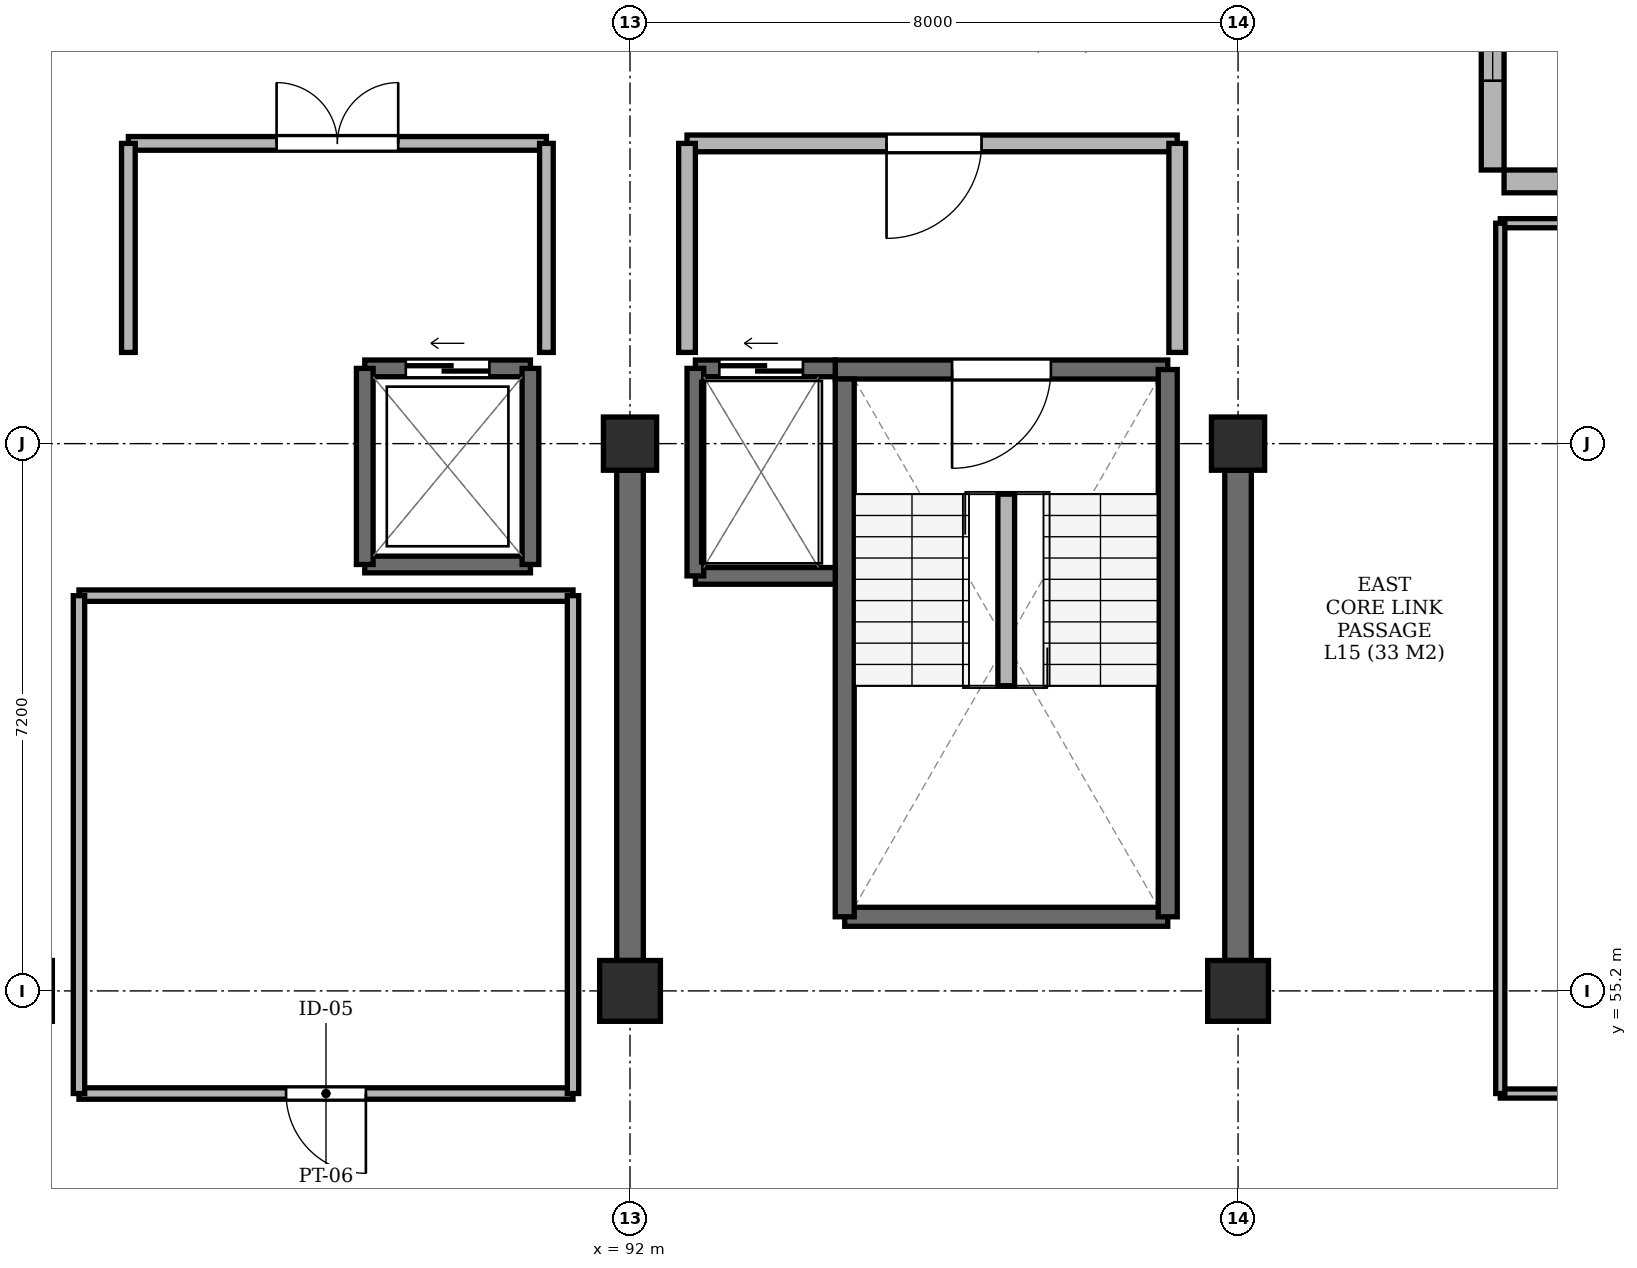
"""IFC4 building model, lengths in metres.
Left out: names, types, materials, properties, quantities, classifications, styles, units other than length and angle.
Written with IfcOpenShell. Run it as: python <this file> out.ifc"""

import sys

from ifc_helpers import new_model, si_unit, direction, frame, frame_2d, origin, origin_2d, place, context, subcontext, project, spatial, rectangle, extrude, element, fill, save


model = new_model("IFC4")
c1 = context("Model", 3, precision=1e-05, world=origin(), true_north=direction((0.0, 1.0)))
c2 = subcontext(c1, "Body", "Model", "MODEL_VIEW")
j1 = project(units=[si_unit("LENGTHUNIT", "METRE"), si_unit("PLANEANGLEUNIT", "RADIAN")], contexts=[c1])
p1 = place(None, origin())
s1 = spatial("IfcSite", under=j1, at=p1, CompositionType="ELEMENT")
p2 = place(p1, origin())
s2 = spatial("IfcBuilding", under=s1, at=p2, CompositionType="ELEMENT")
p3 = place(p2, frame((0.0, 0.0, 60.05)))
s3 = spatial("IfcBuildingStorey", under=s2, at=p3, CompositionType="ELEMENT", Elevation=60.05)
for number, where, z_axis, x_axis in (
    (1, (84.0, 55.2, -0.21), (0.0, 0.0, 1.0), (1.0, 0.0, 0.0)),
    (2, (92.0, 55.2, -0.21), (0.0, 0.0, 1.0), (1.0, 0.0, 0.0)),
):
    element("IfcColumn", number, at=place(p3, frame(where, z_axis=z_axis, x_axis=x_axis)), inside=s3, PredefinedType="COLUMN", context=c2, shape_type="SweptSolid", body=[
        extrude(rectangle(XDim=0.8, YDim=0.8, at=origin_2d()), origin(), (0.0, 0.0, 1.0), 3.25),
    ])
p4 = place(p3, frame((92.0, 62.4, -0.21), z_axis=(0.0, 0.0, 1.0), x_axis=(1.0, 0.0, 0.0)))
e3 = element("IfcColumn", 3, at=p4, inside=s3, PredefinedType="COLUMN", context=c2, shape_type="SweptSolid", body=[
    extrude(rectangle(XDim=0.7, YDim=0.7, at=origin_2d()), origin(), (0.0, 0.0, 1.0), 3.25),
])
p5 = place(p3, frame((100.0, 55.2, -0.21), z_axis=(0.0, 0.0, 1.0), x_axis=(1.0, 0.0, 0.0)))
e4 = element("IfcColumn", 4, at=p5, inside=s3, PredefinedType="COLUMN", context=c2, shape_type="SweptSolid", body=[
    extrude(rectangle(XDim=0.8, YDim=0.8, at=origin_2d()), origin(), (0.0, 0.0, 1.0), 3.25),
])
p6 = place(p3, frame((100.0, 62.4, -0.21), z_axis=(0.0, 0.0, 1.0), x_axis=(1.0, 0.0, 0.0)))
e5 = element("IfcColumn", 5, at=p6, inside=s3, PredefinedType="COLUMN", context=c2, shape_type="SweptSolid", body=[
    extrude(rectangle(XDim=0.7, YDim=0.7, at=origin_2d()), origin(), (0.0, 0.0, 1.0), 3.25),
])
for number, where, z_axis, x_axis in (
    (6, (92.0, 55.6, 0.0), (0.0, 0.0, 1.0), (0.0, 1.0, 0.0)),
    (7, (100.0, 55.6, 0.0), (0.0, 0.0, 1.0), (0.0, 1.0, 0.0)),
):
    element("IfcWall", number, at=place(p3, frame(where, z_axis=z_axis, x_axis=x_axis)), inside=s3, PredefinedType="SHEAR", context=c2, shape_type="SweptSolid", body=[
        extrude(rectangle(XDim=6.45, YDim=0.35, at=frame_2d((3.225, 0.0))), origin(), (0.0, 0.0, 1.0), 3.04),
    ])
p7 = place(p3, frame((108.0, 65.85, 0.0), z_axis=(0.0, 0.0, 1.0), x_axis=(-1.0, 0.0, 0.0)))
e8 = element("IfcWall", 8, at=p7, inside=s3, PredefinedType="SOLIDWALL", context=c2, shape_type="SweptSolid", body=[
    extrude(rectangle(XDim=4.5, YDim=0.3, at=frame_2d((2.25, 0.0))), origin(), (0.0, 0.0, 1.0), 2.53),
])
p8 = place(p7, frame((1.575, 0.0, 0.62)))
e9 = element("IfcOpeningElement", 9, at=p8, cuts=e8, PredefinedType="OPENING", context=c2, shape_type="SweptSolid", body=[
    extrude(rectangle(XDim=1.35, YDim=1.8, at=frame_2d((0.675, 0.9))), frame((0.0, 0.162, 0.0), z_axis=(0.0, -1.0, 0.0), x_axis=(1.0, 0.0, 0.0)), (0.0, 0.0, 1.0), 0.324),
])
p9 = place(p3, frame((103.35, 66.0, 0.0), z_axis=(0.0, 0.0, 1.0), x_axis=(0.0, 1.0, 0.0)))
e10 = element("IfcWall", 10, at=p9, inside=s3, PredefinedType="SOLIDWALL", context=c2, shape_type="SweptSolid", body=[
    extrude(rectangle(XDim=3.6, YDim=0.3, at=frame_2d((1.8, 0.0))), origin(), (0.0, 0.0, 1.0), 2.53),
])
p10 = place(p9, frame((1.175, 0.0, 0.62)))
e11 = element("IfcOpeningElement", 11, at=p10, cuts=e10, PredefinedType="OPENING", context=c2, shape_type="SweptSolid", body=[
    extrude(rectangle(XDim=1.25, YDim=1.75, at=frame_2d((0.625, 0.875))), frame((0.0, 0.162, 0.0), z_axis=(0.0, -1.0, 0.0), x_axis=(1.0, 0.0, 0.0)), (0.0, 0.0, 1.0), 0.324),
])
p11 = place(p3, frame((94.825, 56.175, 0.0), z_axis=(0.0, 0.0, 1.0), x_axis=(1.0, 0.0, 0.0)))
e12 = element("IfcWall", 12, at=p11, inside=s3, PredefinedType="SHEAR", context=c2, shape_type="SweptSolid", body=[
    extrude(rectangle(XDim=4.25, YDim=0.25, at=frame_2d((2.125, 0.0))), origin(), (0.0, 0.0, 1.0), 3.04),
])
p12 = place(p3, frame((99.075, 63.375, 0.0), z_axis=(0.0, 0.0, 1.0), x_axis=(-1.0, 0.0, 0.0)))
e13 = element("IfcWall", 13, at=p12, inside=s3, PredefinedType="SHEAR", context=c2, shape_type="SweptSolid", body=[
    extrude(rectangle(XDim=4.375, YDim=0.25, at=frame_2d((2.188, 0.0))), origin(), (0.0, 0.0, 1.0), 3.04),
])
p13 = place(p12, frame((1.538, 0.0, 0.0)))
e14 = element("IfcOpeningElement", 14, at=p13, cuts=e13, PredefinedType="OPENING", context=c2, shape_type="SweptSolid", body=[
    extrude(rectangle(XDim=1.3, YDim=2.2, at=frame_2d((0.65, 1.1))), frame((0.0, 0.137, 0.0), z_axis=(0.0, -1.0, 0.0), x_axis=(1.0, 0.0, 0.0)), (0.0, 0.0, 1.0), 0.274),
])
p14 = place(p3, frame((94.825, 63.25, 0.0), z_axis=(0.0, 0.0, 1.0), x_axis=(0.0, -1.0, 0.0)))
e15 = element("IfcWall", 15, at=p14, inside=s3, PredefinedType="SHEAR", context=c2, shape_type="SweptSolid", body=[
    extrude(rectangle(XDim=7.075, YDim=0.25, at=frame_2d((3.538, 0.0))), origin(), (0.0, 0.0, 1.0), 3.04),
])
p15 = place(p3, frame((99.075, 56.175, 0.0), z_axis=(0.0, 0.0, 1.0), x_axis=(0.0, 1.0, 0.0)))
e16 = element("IfcWall", 16, at=p15, inside=s3, PredefinedType="SHEAR", context=c2, shape_type="SweptSolid", body=[
    extrude(rectangle(XDim=7.2, YDim=0.25, at=frame_2d((3.6, 0.0))), origin(), (0.0, 0.0, 1.0), 3.04),
])
p16 = place(p3, frame((96.95, 59.215, 0.0), z_axis=(0.0, 0.0, 1.0), x_axis=(0.0, 1.0, 0.0)))
e17 = element("IfcWall", 17, at=p16, inside=s3, PredefinedType="PARTITIONING", context=c2, shape_type="SweptSolid", body=[
    extrude(rectangle(XDim=2.52, YDim=0.22, at=frame_2d((1.26, 0.0))), origin(), (0.0, 0.0, 1.0), 3.04),
])
p17 = place(p3, frame((92.86, 60.66, 0.0), z_axis=(0.0, 0.0, 1.0), x_axis=(1.0, 0.0, 0.0)))
e18 = element("IfcWall", 18, at=p17, inside=s3, PredefinedType="SHEAR", context=c2, shape_type="SweptSolid", body=[
    extrude(rectangle(XDim=1.84, YDim=0.22, at=frame_2d((0.92, 0.0))), origin(), (0.0, 0.0, 1.0), 3.04),
])
p18 = place(p3, frame((94.7, 63.39, 0.0), z_axis=(0.0, 0.0, 1.0), x_axis=(-1.0, 0.0, 0.0)))
e19 = element("IfcWall", 19, at=p18, inside=s3, PredefinedType="SHEAR", context=c2, shape_type="SweptSolid", body=[
    extrude(rectangle(XDim=1.84, YDim=0.22, at=frame_2d((0.92, 0.0))), origin(), (0.0, 0.0, 1.0), 3.04),
])
p19 = place(p18, frame((0.425, 0.0, 0.0)))
e20 = element("IfcOpeningElement", 20, at=p19, cuts=e19, PredefinedType="OPENING", context=c2, shape_type="SweptSolid", body=[
    extrude(rectangle(XDim=1.1, YDim=2.2, at=frame_2d((0.55, 1.1))), frame((0.0, 0.122, 0.0), z_axis=(0.0, -1.0, 0.0), x_axis=(1.0, 0.0, 0.0)), (0.0, 0.0, 1.0), 0.244),
])
p20 = place(p3, frame((92.86, 63.39, 0.0), z_axis=(0.0, 0.0, 1.0), x_axis=(0.0, -1.0, 0.0)))
e21 = element("IfcWall", 21, at=p20, inside=s3, PredefinedType="SHEAR", context=c2, shape_type="SweptSolid", body=[
    extrude(rectangle(XDim=2.73, YDim=0.22, at=frame_2d((1.365, 0.0))), origin(), (0.0, 0.0, 1.0), 3.04),
])
p21 = place(p3, frame((88.51, 60.81, 0.0), z_axis=(0.0, 0.0, 1.0), x_axis=(1.0, 0.0, 0.0)))
e22 = element("IfcWall", 22, at=p21, inside=s3, PredefinedType="SHEAR", context=c2, shape_type="SweptSolid", body=[
    extrude(rectangle(XDim=2.18, YDim=0.22, at=frame_2d((1.09, 0.0))), origin(), (0.0, 0.0, 1.0), 3.04),
])
p22 = place(p3, frame((90.69, 63.39, 0.0), z_axis=(0.0, 0.0, 1.0), x_axis=(-1.0, 0.0, 0.0)))
e23 = element("IfcWall", 23, at=p22, inside=s3, PredefinedType="SHEAR", context=c2, shape_type="SweptSolid", body=[
    extrude(rectangle(XDim=2.18, YDim=0.22, at=frame_2d((1.09, 0.0))), origin(), (0.0, 0.0, 1.0), 3.04),
])
p23 = place(p22, frame((0.54, 0.0, 0.0)))
e24 = element("IfcOpeningElement", 24, at=p23, cuts=e23, PredefinedType="OPENING", context=c2, shape_type="SweptSolid", body=[
    extrude(rectangle(XDim=1.1, YDim=2.2, at=frame_2d((0.55, 1.1))), frame((0.0, 0.122, 0.0), z_axis=(0.0, -1.0, 0.0), x_axis=(1.0, 0.0, 0.0)), (0.0, 0.0, 1.0), 0.244),
])
for number, where, z_axis, x_axis in (
    (25, (88.51, 63.39, 0.0), (0.0, 0.0, 1.0), (0.0, -1.0, 0.0)),
    (26, (90.69, 60.81, 0.0), (0.0, 0.0, 1.0), (0.0, 1.0, 0.0)),
):
    element("IfcWall", number, at=place(p3, frame(where, z_axis=z_axis, x_axis=x_axis)), inside=s3, PredefinedType="SHEAR", context=c2, shape_type="SweptSolid", body=[
        extrude(rectangle(XDim=2.58, YDim=0.22, at=frame_2d((1.29, 0.0))), origin(), (0.0, 0.0, 1.0), 3.04),
    ])
p24 = place(p3, frame((92.75, 66.35, 0.0), z_axis=(0.0, 0.0, 1.0), x_axis=(1.0, 0.0, 0.0)))
e27 = element("IfcWall", 27, at=p24, inside=s3, PredefinedType="PARTITIONING", context=c2, shape_type="SweptSolid", body=[
    extrude(rectangle(XDim=6.45, YDim=0.22, at=frame_2d((3.225, 0.0))), origin(), (0.0, 0.0, 1.0), 2.53),
])
p25 = place(p24, frame((2.625, 0.0, 0.0)))
e28 = element("IfcOpeningElement", 28, at=p25, cuts=e27, PredefinedType="OPENING", context=c2, shape_type="SweptSolid", body=[
    extrude(rectangle(XDim=1.25, YDim=2.2, at=frame_2d((0.625, 1.1))), frame((0.0, 0.122, 0.0), z_axis=(0.0, -1.0, 0.0), x_axis=(1.0, 0.0, 0.0)), (0.0, 0.0, 1.0), 0.244),
])
for number, where, z_axis, x_axis in (
    (29, (92.75, 63.6, 0.0), (0.0, 0.0, 1.0), (0.0, 1.0, 0.0)),
    (30, (99.2, 63.6, 0.0), (0.0, 0.0, 1.0), (0.0, 1.0, 0.0)),
):
    element("IfcWall", number, at=place(p3, frame(where, z_axis=z_axis, x_axis=x_axis)), inside=s3, PredefinedType="PARTITIONING", context=c2, shape_type="SweptSolid", body=[
        extrude(rectangle(XDim=2.75, YDim=0.22, at=frame_2d((1.375, 0.0))), origin(), (0.0, 0.0, 1.0), 2.53),
    ])
p26 = place(p3, frame((85.4, 66.35, 0.0), z_axis=(0.0, 0.0, 1.0), x_axis=(1.0, 0.0, 0.0)))
e31 = element("IfcWall", 31, at=p26, inside=s3, PredefinedType="PARTITIONING", context=c2, shape_type="SweptSolid", body=[
    extrude(rectangle(XDim=5.5, YDim=0.18, at=frame_2d((2.75, 0.0))), origin(), (0.0, 0.0, 1.0), 2.53),
])
p27 = place(p26, frame((1.95, 0.0, 0.0)))
e32 = element("IfcOpeningElement", 32, at=p27, cuts=e31, PredefinedType="OPENING", context=c2, shape_type="SweptSolid", body=[
    extrude(rectangle(XDim=1.6, YDim=2.2, at=frame_2d((0.8, 1.1))), frame((0.0, 0.102, 0.0), z_axis=(0.0, -1.0, 0.0), x_axis=(1.0, 0.0, 0.0)), (0.0, 0.0, 1.0), 0.204),
])
for number, where, z_axis, x_axis in (
    (33, (85.4, 63.6, 0.0), (0.0, 0.0, 1.0), (0.0, 1.0, 0.0)),
    (34, (90.9, 63.6, 0.0), (0.0, 0.0, 1.0), (0.0, 1.0, 0.0)),
):
    element("IfcWall", number, at=place(p3, frame(where, z_axis=z_axis, x_axis=x_axis)), inside=s3, PredefinedType="PARTITIONING", context=c2, shape_type="SweptSolid", body=[
        extrude(rectangle(XDim=2.75, YDim=0.18, at=frame_2d((1.375, 0.0))), origin(), (0.0, 0.0, 1.0), 2.53),
    ])
p28 = place(p3, frame((103.45, 53.85, 0.0), z_axis=(0.0, 0.0, 1.0), x_axis=(1.0, 0.0, 0.0)))
e35 = element("IfcWall", 35, at=p28, inside=s3, PredefinedType="PARTITIONING", context=c2, shape_type="SweptSolid", body=[
    extrude(rectangle(XDim=3.75, YDim=0.12, at=frame_2d((1.875, 0.0))), origin(), (0.0, 0.0, 1.0), 2.53),
])
p29 = place(p28, frame((1.3, 0.0, 0.0)))
e36 = element("IfcOpeningElement", 36, at=p29, cuts=e35, PredefinedType="OPENING", context=c2, shape_type="SweptSolid", body=[
    extrude(rectangle(XDim=1.1, YDim=2.15, at=frame_2d((0.55, 1.075))), frame((0.0, 0.072, 0.0), z_axis=(0.0, -1.0, 0.0), x_axis=(1.0, 0.0, 0.0)), (0.0, 0.0, 1.0), 0.144),
])
p30 = place(p3, frame((103.45, 65.3, 0.0), z_axis=(0.0, 0.0, 1.0), x_axis=(1.0, 0.0, 0.0)))
e37 = element("IfcWall", 37, at=p30, inside=s3, PredefinedType="PARTITIONING", context=c2, shape_type="SweptSolid", body=[
    extrude(rectangle(XDim=3.75, YDim=0.12, at=frame_2d((1.875, 0.0))), origin(), (0.0, 0.0, 1.0), 2.53),
])
p31 = place(p3, frame((103.45, 53.85, 0.0), z_axis=(0.0, 0.0, 1.0), x_axis=(0.0, 1.0, 0.0)))
e38 = element("IfcWall", 38, at=p31, inside=s3, PredefinedType="PARTITIONING", context=c2, shape_type="SweptSolid", body=[
    extrude(rectangle(XDim=11.45, YDim=0.12, at=frame_2d((5.725, 0.0))), origin(), (0.0, 0.0, 1.0), 2.53),
])
p32 = place(p3, frame((84.75, 53.85, 0.0), z_axis=(0.0, 0.0, 1.0), x_axis=(1.0, 0.0, 0.0)))
e39 = element("IfcWall", 39, at=p32, inside=s3, PredefinedType="PARTITIONING", context=c2, shape_type="SweptSolid", body=[
    extrude(rectangle(XDim=6.5, YDim=0.15, at=frame_2d((3.25, 0.0))), origin(), (0.0, 0.0, 1.0), 2.53),
])
p33 = place(p32, frame((2.725, 0.0, 0.0)))
e40 = element("IfcOpeningElement", 40, at=p33, cuts=e39, PredefinedType="OPENING", context=c2, shape_type="SweptSolid", body=[
    extrude(rectangle(XDim=1.05, YDim=2.15, at=frame_2d((0.525, 1.075))), frame((0.0, 0.087, 0.0), z_axis=(0.0, -1.0, 0.0), x_axis=(1.0, 0.0, 0.0)), (0.0, 0.0, 1.0), 0.174),
])
p34 = place(p3, frame((84.75, 60.4, 0.0), z_axis=(0.0, 0.0, 1.0), x_axis=(1.0, 0.0, 0.0)))
e41 = element("IfcWall", 41, at=p34, inside=s3, PredefinedType="PARTITIONING", context=c2, shape_type="SweptSolid", body=[
    extrude(rectangle(XDim=6.5, YDim=0.15, at=frame_2d((3.25, 0.0))), origin(), (0.0, 0.0, 1.0), 2.53),
])
for number, where, z_axis, x_axis in (
    (42, (84.75, 53.85, 0.0), (0.0, 0.0, 1.0), (0.0, 1.0, 0.0)),
    (43, (91.25, 53.85, 0.0), (0.0, 0.0, 1.0), (0.0, 1.0, 0.0)),
):
    element("IfcWall", number, at=place(p3, frame(where, z_axis=z_axis, x_axis=x_axis)), inside=s3, PredefinedType="PARTITIONING", context=c2, shape_type="SweptSolid", body=[
        extrude(rectangle(XDim=6.55, YDim=0.15, at=frame_2d((3.275, 0.0))), origin(), (0.0, 0.0, 1.0), 2.53),
    ])
p35 = place(p10, origin())
e44 = element("IfcWindow", 44, at=p35, inside=s3, PartitioningType="SINGLE_PANEL", PredefinedType="WINDOW", context=c2, shape_type="SweptSolid", body=[
    extrude(rectangle(XDim=1.25, YDim=1.75, at=frame_2d((0.625, 0.875))), frame((0.0, 0.03, 0.0), z_axis=(0.0, -1.0, 0.0), x_axis=(1.0, 0.0, 0.0)), (0.0, 0.0, 1.0), 0.06),
])
fill(e11, e44)
p36 = place(p13, origin())
e45 = element("IfcDoor", 45, at=p36, inside=s3, OperationType="SINGLE_SWING_RIGHT", PredefinedType="DOOR", context=c2, shape_type="SweptSolid", body=[
    extrude(rectangle(XDim=1.3, YDim=2.2, at=frame_2d((0.65, 1.1))), frame((0.0, 0.025, 0.0), z_axis=(0.0, -1.0, 0.0), x_axis=(1.0, 0.0, 0.0)), (0.0, 0.0, 1.0), 0.05),
])
fill(e14, e45)
p37 = place(p19, origin())
e46 = element("IfcDoor", 46, at=p37, inside=s3, OperationType="SLIDING_TO_RIGHT", PredefinedType="DOOR", context=c2, shape_type="SweptSolid", body=[
    extrude(rectangle(XDim=1.1, YDim=2.2, at=frame_2d((0.55, 1.1))), frame((0.0, 0.025, 0.0), z_axis=(0.0, -1.0, 0.0), x_axis=(1.0, 0.0, 0.0)), (0.0, 0.0, 1.0), 0.05),
])
fill(e20, e46)
p38 = place(p23, origin())
e47 = element("IfcDoor", 47, at=p38, inside=s3, OperationType="SLIDING_TO_RIGHT", PredefinedType="DOOR", context=c2, shape_type="SweptSolid", body=[
    extrude(rectangle(XDim=1.1, YDim=2.2, at=frame_2d((0.55, 1.1))), frame((0.0, 0.025, 0.0), z_axis=(0.0, -1.0, 0.0), x_axis=(1.0, 0.0, 0.0)), (0.0, 0.0, 1.0), 0.05),
])
fill(e24, e47)
p39 = place(p25, frame((1.25, 0.0, 0.0), z_axis=(0.0, 0.0, 1.0), x_axis=(-1.0, 0.0, 0.0)))
e48 = element("IfcDoor", 48, at=p39, inside=s3, OperationType="SINGLE_SWING_LEFT", PredefinedType="DOOR", context=c2, shape_type="SweptSolid", body=[
    extrude(rectangle(XDim=1.25, YDim=2.2, at=frame_2d((0.625, 1.1))), frame((0.0, 0.025, 0.0), z_axis=(0.0, -1.0, 0.0), x_axis=(1.0, 0.0, 0.0)), (0.0, 0.0, 1.0), 0.05),
])
fill(e28, e48)
p40 = place(p27, origin())
e49 = element("IfcDoor", 49, at=p40, inside=s3, OperationType="DOUBLE_DOOR_SINGLE_SWING", PredefinedType="DOOR", context=c2, shape_type="SweptSolid", body=[
    extrude(rectangle(XDim=1.6, YDim=2.2, at=frame_2d((0.8, 1.1))), frame((0.0, 0.025, 0.0), z_axis=(0.0, -1.0, 0.0), x_axis=(1.0, 0.0, 0.0)), (0.0, 0.0, 1.0), 0.05),
])
fill(e32, e49)
p41 = place(p33, frame((1.05, 0.0, 0.0), z_axis=(0.0, 0.0, 1.0), x_axis=(-1.0, 0.0, 0.0)))
e50 = element("IfcDoor", 50, at=p41, inside=s3, OperationType="SINGLE_SWING_RIGHT", PredefinedType="DOOR", context=c2, shape_type="SweptSolid", body=[
    extrude(rectangle(XDim=1.05, YDim=2.15, at=frame_2d((0.525, 1.075))), frame((0.0, 0.025, 0.0), z_axis=(0.0, -1.0, 0.0), x_axis=(1.0, 0.0, 0.0)), (0.0, 0.0, 1.0), 0.05),
])
fill(e40, e50)
save(model, sys.argv[1])
